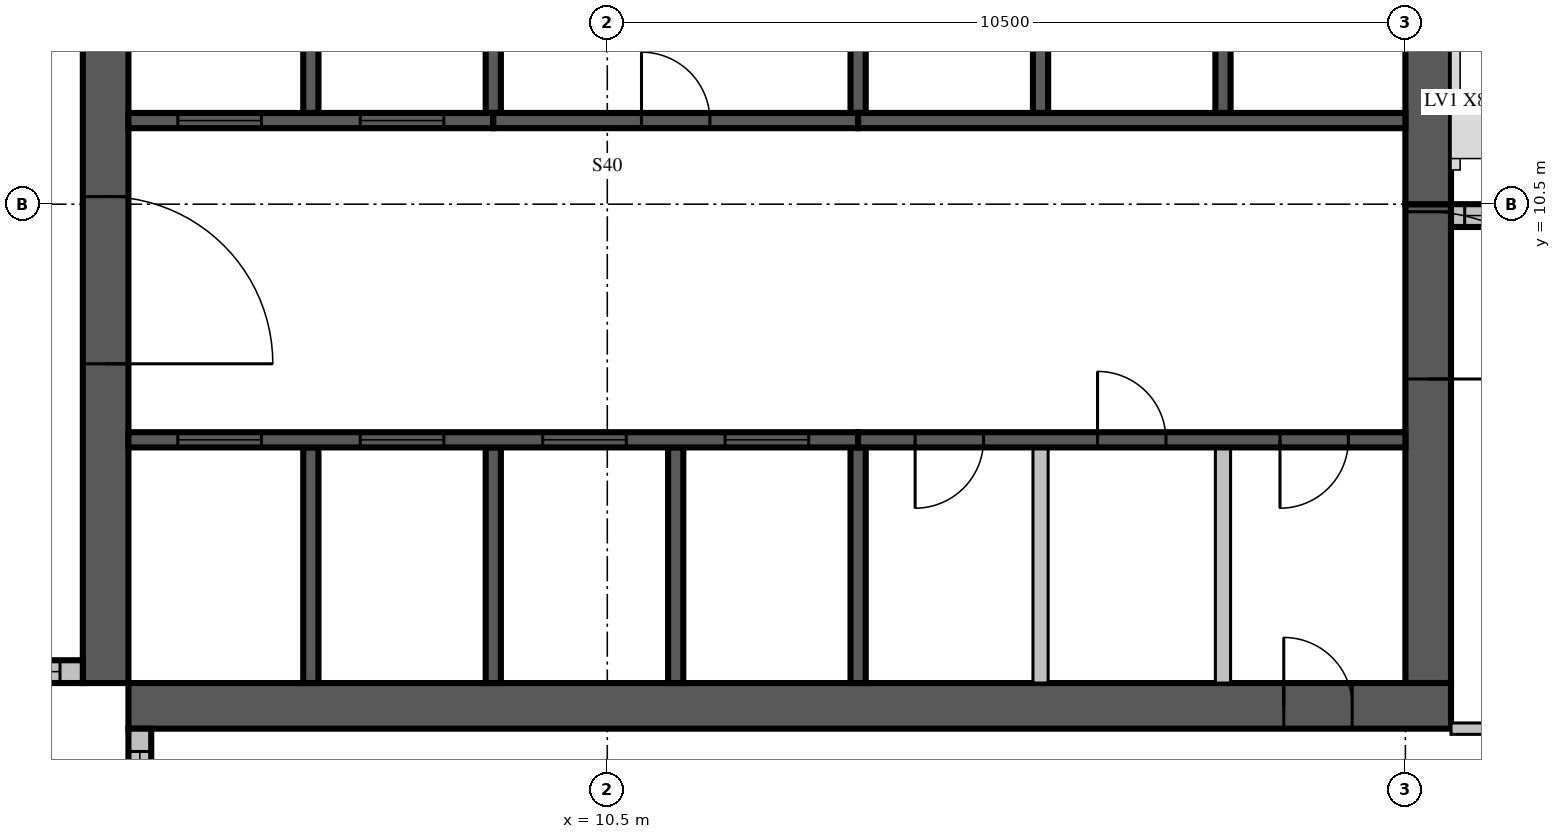
"""IFC4 building model, lengths in metres.
Left out: names, types, materials, properties, quantities, classifications, styles, units other than length and angle.
Written with IfcOpenShell. Run it as: python <this file> out.ifc"""

import sys

from ifc_helpers import new_model, si_unit, direction, frame, frame_2d, origin, place, context, subcontext, project, spatial, rectangle, extrude, source, transform, mapped, element, fill, save


model = new_model("IFC4")
c1 = context("Model", 3, precision=1e-05, world=origin(), true_north=direction((0.0, 1.0)))
c2 = subcontext(c1, "Body", "Model", "MODEL_VIEW")
j1 = project(units=[si_unit("LENGTHUNIT", "METRE"), si_unit("PLANEANGLEUNIT", "RADIAN")], contexts=[c1])
p1 = place(None, origin())
s1 = spatial("IfcSite", under=j1, at=p1, CompositionType="ELEMENT")
p2 = place(p1, origin())
s2 = spatial("IfcBuilding", under=s1, at=p2, CompositionType="ELEMENT")
p3 = place(p2, frame((0.0, 0.0, 326.5)))
s3 = spatial("IfcBuildingStorey", under=s2, at=p3, CompositionType="ELEMENT", Elevation=326.5)
m1 = source(origin(), c2, "Body", "SweptSolid", [
    extrude(rectangle(XDim=17.4, YDim=0.6, at=frame_2d((8.7, 0.0))), origin(), (0.0, 0.0, 1.0), 3.5),
])
p4 = place(p3, frame((3.9, 4.2, 0.0), z_axis=(0.0, 0.0, 1.0), x_axis=(0.0, 1.0, 0.0)))
e1 = element("IfcWall", 1, at=p4, inside=s3, PredefinedType="SHEAR", context=c2, shape_type="MappedRepresentation", body=[
    mapped(m1, transform((0.0, 0.0, 0.0), scale=1.0)),
])
m2 = source(origin(), c2, "Body", "SweptSolid", [
    extrude(rectangle(XDim=2.2, YDim=2.1, at=frame_2d((1.1, 1.05))), frame((0.0, 0.31, 0.0), z_axis=(0.0, -1.0, 0.0), x_axis=(1.0, 0.0, 0.0)), (0.0, 0.0, 1.0), 0.62),
])
p5 = place(p4, frame((4.2, 0.0, 0.0)))
e2 = element("IfcOpeningElement", 2, at=p5, cuts=e1, PredefinedType="OPENING", context=c2, shape_type="MappedRepresentation", body=[
    mapped(m2, transform((0.0, 0.0, 0.0), scale=1.0)),
])
m3 = source(origin(), c2, "Body", "SweptSolid", [
    extrude(rectangle(XDim=6.3, YDim=0.6, at=frame_2d((3.15, 0.0))), origin(), (0.0, 0.0, 1.0), 3.5),
])
p6 = place(p3, frame((21.3, 4.2, 0.0), z_axis=(0.0, 0.0, 1.0), x_axis=(0.0, 1.0, 0.0)))
e3 = element("IfcWall", 3, at=p6, inside=s3, PredefinedType="SHEAR", context=c2, shape_type="MappedRepresentation", body=[
    mapped(m3, transform((0.0, 0.0, 0.0), scale=1.0)),
])
p7 = place(p6, frame((4.0, 0.0, 0.0)))
e4 = element("IfcOpeningElement", 4, at=p7, cuts=e3, PredefinedType="OPENING", context=c2, shape_type="MappedRepresentation", body=[
    mapped(m2, transform((0.0, 0.0, 0.0), scale=1.0)),
])
p8 = place(p3, frame((4.2, 3.9, 0.0), z_axis=(0.0, 0.0, 1.0), x_axis=(1.0, 0.0, 0.0)))
e5 = element("IfcWall", 5, at=p8, inside=s3, PredefinedType="SHEAR", context=c2, shape_type="MappedRepresentation", body=[
    mapped(m1, transform((0.0, 0.0, 0.0), scale=1.0)),
])
m4 = source(origin(), c2, "Body", "SweptSolid", [
    extrude(rectangle(XDim=0.9, YDim=2.1, at=frame_2d((0.45, 1.05))), frame((0.0, 0.31, 0.0), z_axis=(0.0, -1.0, 0.0), x_axis=(1.0, 0.0, 0.0)), (0.0, 0.0, 1.0), 0.62),
])
p9 = place(p8, frame((15.2, 0.0, 0.0)))
e6 = element("IfcOpeningElement", 6, at=p9, cuts=e5, PredefinedType="OPENING", context=c2, shape_type="MappedRepresentation", body=[
    mapped(m4, transform((0.0, 0.0, 0.0), scale=1.0)),
])
m5 = source(origin(), c2, "Body", "SweptSolid", [
    extrude(rectangle(XDim=10.5, YDim=0.6, at=frame_2d((5.25, 0.0))), origin(), (0.0, 0.0, 1.0), 3.5),
])
p10 = place(p3, frame((21.3, 10.5, 0.0), z_axis=(0.0, 0.0, 1.0), x_axis=(0.0, 1.0, 0.0)))
e7 = element("IfcWall", 7, at=p10, inside=s3, PredefinedType="SHEAR", context=c2, shape_type="MappedRepresentation", body=[
    mapped(m5, transform((0.0, 0.0, 0.0), scale=1.0)),
])
m6 = source(origin(), c2, "Body", "SweptSolid", [
    extrude(rectangle(XDim=1.2, YDim=2.4, at=frame_2d((0.6, 1.2))), frame((0.0, 0.31, 0.0), z_axis=(0.0, -1.0, 0.0), x_axis=(1.0, 0.0, 0.0)), (0.0, 0.0, 1.0), 0.62),
])
p11 = place(p10, frame((5.7, 0.0, 0.6)))
e8 = element("IfcOpeningElement", 8, at=p11, cuts=e7, PredefinedType="OPENING", context=c2, shape_type="MappedRepresentation", body=[
    mapped(m6, transform((0.0, 0.0, 0.0), scale=1.0)),
])
p12 = place(p3, frame((29.1, 10.35, 0.0), z_axis=(0.0, 0.0, 1.0), x_axis=(-1.0, 0.0, 0.0)))
e9 = element("IfcWall", 9, at=p12, inside=s3, PredefinedType="STANDARD", context=c2, shape_type="SweptSolid", body=[
    extrude(rectangle(XDim=7.5, YDim=0.3, at=frame_2d((3.75, 0.0))), origin(), (0.0, 0.0, 1.0), 3.1),
])
m7 = source(origin(), c2, "Body", "SweptSolid", [
    extrude(rectangle(XDim=3.0, YDim=2.0, at=frame_2d((1.5, 1.0))), frame((0.0, 0.16, 0.0), z_axis=(0.0, -1.0, 0.0), x_axis=(1.0, 0.0, 0.0)), (0.0, 0.0, 1.0), 0.32),
])
p13 = place(p12, frame((1.14, 0.0, 0.6)))
e10 = element("IfcOpeningElement", 10, at=p13, cuts=e9, PredefinedType="OPENING", context=c2, shape_type="MappedRepresentation", body=[
    mapped(m7, transform((0.0, 0.0, 0.0), scale=1.0)),
])
m8 = source(origin(), c2, "Body", "SweptSolid", [
    extrude(rectangle(XDim=1.8, YDim=2.0, at=frame_2d((0.9, 1.0))), frame((0.0, 0.16, 0.0), z_axis=(0.0, -1.0, 0.0), x_axis=(1.0, 0.0, 0.0)), (0.0, 0.0, 1.0), 0.32),
])
p14 = place(p12, frame((5.52, 0.0, 0.6)))
e11 = element("IfcOpeningElement", 11, at=p14, cuts=e9, PredefinedType="OPENING", context=c2, shape_type="MappedRepresentation", body=[
    mapped(m8, transform((0.0, 0.0, 0.0), scale=1.0)),
])
m9 = source(origin(), c2, "Body", "SweptSolid", [
    extrude(rectangle(XDim=3.6, YDim=0.3, at=frame_2d((1.8, 0.0))), origin(), (0.0, 0.0, 1.0), 3.1),
])
p15 = place(p3, frame((0.0, 4.35, 0.0), z_axis=(0.0, 0.0, 1.0), x_axis=(1.0, 0.0, 0.0)))
e12 = element("IfcWall", 12, at=p15, inside=s3, PredefinedType="STANDARD", context=c2, shape_type="MappedRepresentation", body=[
    mapped(m9, transform((0.0, 0.0, 0.0), scale=1.0)),
])
m10 = source(origin(), c2, "Body", "SweptSolid", [
    extrude(rectangle(XDim=2.4, YDim=2.0, at=frame_2d((1.2, 1.0))), frame((0.0, 0.16, 0.0), z_axis=(0.0, -1.0, 0.0), x_axis=(1.0, 0.0, 0.0)), (0.0, 0.0, 1.0), 0.32),
])
p16 = place(p15, frame((0.9, 0.0, 0.6)))
e13 = element("IfcOpeningElement", 13, at=p16, cuts=e12, PredefinedType="OPENING", context=c2, shape_type="MappedRepresentation", body=[
    mapped(m10, transform((0.0, 0.0, 0.0), scale=1.0)),
])
p17 = place(p3, frame((4.35, 3.6, 0.0), z_axis=(0.0, 0.0, 1.0), x_axis=(0.0, -1.0, 0.0)))
e14 = element("IfcWall", 14, at=p17, inside=s3, PredefinedType="STANDARD", context=c2, shape_type="MappedRepresentation", body=[
    mapped(m9, transform((0.0, 0.0, 0.0), scale=1.0)),
])
p18 = place(p17, frame((0.3, 0.0, 0.6)))
e15 = element("IfcOpeningElement", 15, at=p18, cuts=e14, PredefinedType="OPENING", context=c2, shape_type="MappedRepresentation", body=[
    mapped(m10, transform((0.0, 0.0, 0.0), scale=1.0)),
])
m11 = source(origin(), c2, "Body", "SweptSolid", [
    extrude(rectangle(XDim=3.1, YDim=0.2, at=frame_2d((1.55, 0.0))), origin(), (0.0, 0.0, 1.0), 3.5),
])
for number, where, z_axis, x_axis in (
    (16, (6.6, 4.2, 0.0), (0.0, 0.0, 1.0), (0.0, 1.0, 0.0)),
    (17, (9.0, 4.2, 0.0), (0.0, 0.0, 1.0), (0.0, 1.0, 0.0)),
    (18, (11.4, 4.2, 0.0), (0.0, 0.0, 1.0), (0.0, 1.0, 0.0)),
):
    element("IfcWall", number, at=place(p3, frame(where, z_axis=z_axis, x_axis=x_axis)), inside=s3, PredefinedType="SOLIDWALL", context=c2, shape_type="MappedRepresentation", body=[
        mapped(m11, transform((0.0, 0.0, 0.0), scale=1.0)),
    ])
m12 = source(origin(), c2, "Body", "SweptSolid", [
    extrude(rectangle(XDim=3.1, YDim=0.2, at=frame_2d((1.55, 0.0))), origin(), (0.0, 0.0, 1.0), 3.1),
])
p19 = place(p3, frame((13.8, 4.2, 0.0), z_axis=(0.0, 0.0, 1.0), x_axis=(0.0, 1.0, 0.0)))
e19 = element("IfcWall", 19, at=p19, inside=s3, PredefinedType="SOLIDWALL", context=c2, shape_type="MappedRepresentation", body=[
    mapped(m12, transform((0.0, 0.0, 0.0), scale=1.0)),
])
m13 = source(origin(), c2, "Body", "SweptSolid", [
    extrude(rectangle(XDim=3.1, YDim=0.2, at=frame_2d((1.55, 0.0))), origin(), (0.0, 0.0, 1.0), 3.1),
])
for number, where, z_axis, x_axis in (
    (20, (16.2, 4.2, 0.0), (0.0, 0.0, 1.0), (0.0, 1.0, 0.0)),
    (21, (18.6, 4.2, 0.0), (0.0, 0.0, 1.0), (0.0, 1.0, 0.0)),
):
    element("IfcWall", number, at=place(p3, frame(where, z_axis=z_axis, x_axis=x_axis)), inside=s3, PredefinedType="PARTITIONING", context=c2, shape_type="MappedRepresentation", body=[
        mapped(m13, transform((0.0, 0.0, 0.0), scale=1.0)),
    ])
m14 = source(origin(), c2, "Body", "SweptSolid", [
    extrude(rectangle(XDim=3.0, YDim=0.2, at=frame_2d((1.5, 0.0))), origin(), (0.0, 0.0, 1.0), 3.5),
])
p20 = place(p3, frame((6.6, 11.7, 0.0), z_axis=(0.0, 0.0, 1.0), x_axis=(0.0, 1.0, 0.0)))
e22 = element("IfcWall", 22, at=p20, inside=s3, PredefinedType="SOLIDWALL", context=c2, shape_type="MappedRepresentation", body=[
    mapped(m14, transform((0.0, 0.0, 0.0), scale=1.0)),
])
m15 = source(origin(), c2, "Body", "SweptSolid", [
    extrude(rectangle(XDim=3.0, YDim=0.2, at=frame_2d((1.5, 0.0))), origin(), (0.0, 0.0, 1.0), 3.1),
])
for number, where, z_axis, x_axis in (
    (23, (9.0, 11.7, 0.0), (0.0, 0.0, 1.0), (0.0, 1.0, 0.0)),
    (24, (13.8, 11.7, 0.0), (0.0, 0.0, 1.0), (0.0, 1.0, 0.0)),
):
    element("IfcWall", number, at=place(p3, frame(where, z_axis=z_axis, x_axis=x_axis)), inside=s3, PredefinedType="SOLIDWALL", context=c2, shape_type="MappedRepresentation", body=[
        mapped(m15, transform((0.0, 0.0, 0.0), scale=1.0)),
    ])
for number, where, z_axis, x_axis in (
    (25, (16.2, 11.7, 0.0), (0.0, 0.0, 1.0), (0.0, 1.0, 0.0)),
    (26, (18.6, 11.7, 0.0), (0.0, 0.0, 1.0), (0.0, 1.0, 0.0)),
):
    element("IfcWall", number, at=place(p3, frame(where, z_axis=z_axis, x_axis=x_axis)), inside=s3, PredefinedType="SOLIDWALL", context=c2, shape_type="MappedRepresentation", body=[
        mapped(m14, transform((0.0, 0.0, 0.0), scale=1.0)),
    ])
m16 = source(origin(), c2, "Body", "SweptSolid", [
    extrude(rectangle(XDim=9.6, YDim=0.2, at=frame_2d((4.8, 0.0))), origin(), (0.0, 0.0, 1.0), 3.5),
])
p21 = place(p3, frame((4.2, 7.4, 0.0), z_axis=(0.0, 0.0, 1.0), x_axis=(1.0, 0.0, 0.0)))
e27 = element("IfcWall", 27, at=p21, inside=s3, PredefinedType="SOLIDWALL", context=c2, shape_type="MappedRepresentation", body=[
    mapped(m16, transform((0.0, 0.0, 0.0), scale=1.0)),
])
m17 = source(origin(), c2, "Body", "SweptSolid", [
    extrude(rectangle(XDim=1.1, YDim=2.1, at=frame_2d((0.55, 1.05))), frame((0.0, 0.11, 0.0), z_axis=(0.0, -1.0, 0.0), x_axis=(1.0, 0.0, 0.0)), (0.0, 0.0, 1.0), 0.22),
])
p22 = place(p21, frame((0.65, 0.0, 0.0)))
e28 = element("IfcOpeningElement", 28, at=p22, cuts=e27, PredefinedType="OPENING", context=c2, shape_type="MappedRepresentation", body=[
    mapped(m17, transform((0.0, 0.0, 0.0), scale=1.0)),
])
p23 = place(p21, frame((3.05, 0.0, 0.0)))
e29 = element("IfcOpeningElement", 29, at=p23, cuts=e27, PredefinedType="OPENING", context=c2, shape_type="MappedRepresentation", body=[
    mapped(m17, transform((0.0, 0.0, 0.0), scale=1.0)),
])
p24 = place(p21, frame((5.45, 0.0, 0.0)))
e30 = element("IfcOpeningElement", 30, at=p24, cuts=e27, PredefinedType="OPENING", context=c2, shape_type="MappedRepresentation", body=[
    mapped(m17, transform((0.0, 0.0, 0.0), scale=1.0)),
])
p25 = place(p21, frame((7.85, 0.0, 0.0)))
e31 = element("IfcOpeningElement", 31, at=p25, cuts=e27, PredefinedType="OPENING", context=c2, shape_type="MappedRepresentation", body=[
    mapped(m17, transform((0.0, 0.0, 0.0), scale=1.0)),
])
m18 = source(origin(), c2, "Body", "SweptSolid", [
    extrude(rectangle(XDim=7.2, YDim=0.2, at=frame_2d((3.6, 0.0))), origin(), (0.0, 0.0, 1.0), 3.1),
])
p26 = place(p3, frame((13.8, 7.4, 0.0), z_axis=(0.0, 0.0, 1.0), x_axis=(1.0, 0.0, 0.0)))
e32 = element("IfcWall", 32, at=p26, inside=s3, PredefinedType="SOLIDWALL", context=c2, shape_type="MappedRepresentation", body=[
    mapped(m18, transform((0.0, 0.0, 0.0), scale=1.0)),
])
m19 = source(origin(), c2, "Body", "SweptSolid", [
    extrude(rectangle(XDim=0.9, YDim=2.1, at=frame_2d((0.45, 1.05))), frame((0.0, 0.11, 0.0), z_axis=(0.0, -1.0, 0.0), x_axis=(1.0, 0.0, 0.0)), (0.0, 0.0, 1.0), 0.22),
])
p27 = place(p26, frame((0.75, 0.0, 0.0)))
e33 = element("IfcOpeningElement", 33, at=p27, cuts=e32, PredefinedType="OPENING", context=c2, shape_type="MappedRepresentation", body=[
    mapped(m19, transform((0.0, 0.0, 0.0), scale=1.0)),
])
p28 = place(p26, frame((3.15, 0.0, 0.0)))
e34 = element("IfcOpeningElement", 34, at=p28, cuts=e32, PredefinedType="OPENING", context=c2, shape_type="MappedRepresentation", body=[
    mapped(m19, transform((0.0, 0.0, 0.0), scale=1.0)),
])
p29 = place(p26, frame((5.55, 0.0, 0.0)))
e35 = element("IfcOpeningElement", 35, at=p29, cuts=e32, PredefinedType="OPENING", context=c2, shape_type="MappedRepresentation", body=[
    mapped(m19, transform((0.0, 0.0, 0.0), scale=1.0)),
])
m20 = source(origin(), c2, "Body", "SweptSolid", [
    extrude(rectangle(XDim=4.8, YDim=0.2, at=frame_2d((2.4, 0.0))), origin(), (0.0, 0.0, 1.0), 3.5),
])
p30 = place(p3, frame((4.2, 11.6, 0.0), z_axis=(0.0, 0.0, 1.0), x_axis=(1.0, 0.0, 0.0)))
e36 = element("IfcWall", 36, at=p30, inside=s3, PredefinedType="SOLIDWALL", context=c2, shape_type="MappedRepresentation", body=[
    mapped(m20, transform((0.0, 0.0, 0.0), scale=1.0)),
])
p31 = place(p30, frame((0.65, 0.0, 0.0)))
e37 = element("IfcOpeningElement", 37, at=p31, cuts=e36, PredefinedType="OPENING", context=c2, shape_type="MappedRepresentation", body=[
    mapped(m17, transform((0.0, 0.0, 0.0), scale=1.0)),
])
p32 = place(p30, frame((3.05, 0.0, 0.0)))
e38 = element("IfcOpeningElement", 38, at=p32, cuts=e36, PredefinedType="OPENING", context=c2, shape_type="MappedRepresentation", body=[
    mapped(m17, transform((0.0, 0.0, 0.0), scale=1.0)),
])
m21 = source(origin(), c2, "Body", "SweptSolid", [
    extrude(rectangle(XDim=4.8, YDim=0.2, at=frame_2d((2.4, 0.0))), origin(), (0.0, 0.0, 1.0), 3.1),
])
p33 = place(p3, frame((9.0, 11.6, 0.0), z_axis=(0.0, 0.0, 1.0), x_axis=(1.0, 0.0, 0.0)))
e39 = element("IfcWall", 39, at=p33, inside=s3, PredefinedType="SOLIDWALL", context=c2, shape_type="MappedRepresentation", body=[
    mapped(m21, transform((0.0, 0.0, 0.0), scale=1.0)),
])
p34 = place(p33, frame((1.95, 0.0, 0.0)))
e40 = element("IfcOpeningElement", 40, at=p34, cuts=e39, PredefinedType="OPENING", context=c2, shape_type="MappedRepresentation", body=[
    mapped(m19, transform((0.0, 0.0, 0.0), scale=1.0)),
])
m22 = source(origin(), c2, "Body", "SweptSolid", [
    extrude(rectangle(XDim=7.2, YDim=0.2, at=frame_2d((3.6, 0.0))), origin(), (0.0, 0.0, 1.0), 3.5),
])
p35 = place(p3, frame((13.8, 11.6, 0.0), z_axis=(0.0, 0.0, 1.0), x_axis=(1.0, 0.0, 0.0)))
e41 = element("IfcWall", 41, at=p35, inside=s3, PredefinedType="SOLIDWALL", context=c2, shape_type="MappedRepresentation", body=[
    mapped(m22, transform((0.0, 0.0, 0.0), scale=1.0)),
])
m23 = source(origin(), c2, "Body", "SweptSolid", [
    extrude(rectangle(XDim=7.725, YDim=0.15, at=frame_2d((3.862, 0.0))), origin(), (0.0, 0.0, 1.0), 3.1),
])
p36 = place(p3, frame((21.6, 3.6, 0.0), z_axis=(0.0, 0.0, 1.0), x_axis=(1.0, 0.0, 0.0)))
e42 = element("IfcWall", 42, at=p36, inside=s3, PredefinedType="PARTITIONING", context=c2, shape_type="MappedRepresentation", body=[
    mapped(m23, transform((0.0, 0.0, 0.0), scale=1.0)),
])
m24 = source(origin(), c2, "Body", "SweptSolid", [
    extrude(rectangle(XDim=1.2, YDim=2.1, at=frame_2d((0.6, 1.05))), frame((0.0, 0.085, 0.0), z_axis=(0.0, -1.0, 0.0), x_axis=(1.0, 0.0, 0.0)), (0.0, 0.0, 1.0), 0.17),
])
p37 = place(p36, frame((0.7, 0.0, 0.0)))
e43 = element("IfcOpeningElement", 43, at=p37, cuts=e42, PredefinedType="OPENING", context=c2, shape_type="MappedRepresentation", body=[
    mapped(m24, transform((0.0, 0.0, 0.0), scale=1.0)),
])
m25 = source(origin(), c2, "Body", "SweptSolid", [
    extrude(rectangle(XDim=0.9, YDim=2.1, at=frame_2d((0.45, 1.05))), frame((0.0, 0.085, 0.0), z_axis=(0.0, -1.0, 0.0), x_axis=(1.0, 0.0, 0.0)), (0.0, 0.0, 1.0), 0.17),
])
p38 = place(p36, frame((3.413, 0.0, 0.0)))
e44 = element("IfcOpeningElement", 44, at=p38, cuts=e42, PredefinedType="OPENING", context=c2, shape_type="MappedRepresentation", body=[
    mapped(m25, transform((0.0, 0.0, 0.0), scale=1.0)),
])
m26 = source(origin(), c2, "Body", "SweptSolid", [
    extrude(rectangle(XDim=1.8, YDim=2.0, at=frame_2d((0.9, 1.0))), frame((0.0, 0.03, 0.0), z_axis=(0.0, -1.0, 0.0), x_axis=(1.0, 0.0, 0.0)), (0.0, 0.0, 1.0), 0.06),
])
p39 = place(p14, origin())
e45 = element("IfcWindow", 45, at=p39, inside=s3, PartitioningType="SINGLE_PANEL", PredefinedType="WINDOW", context=c2, shape_type="MappedRepresentation", body=[
    mapped(m26, transform((0.0, 0.0, 0.0), scale=1.0)),
])
fill(e11, e45)
m27 = source(origin(), c2, "Body", "SweptSolid", [
    extrude(rectangle(XDim=2.4, YDim=2.0, at=frame_2d((1.2, 1.0))), frame((0.0, 0.03, 0.0), z_axis=(0.0, -1.0, 0.0), x_axis=(1.0, 0.0, 0.0)), (0.0, 0.0, 1.0), 0.06),
])
p40 = place(p16, origin())
e46 = element("IfcWindow", 46, at=p40, inside=s3, PartitioningType="SINGLE_PANEL", PredefinedType="WINDOW", context=c2, shape_type="MappedRepresentation", body=[
    mapped(m27, transform((0.0, 0.0, 0.0), scale=1.0)),
])
fill(e13, e46)
p41 = place(p18, origin())
e47 = element("IfcWindow", 47, at=p41, inside=s3, PartitioningType="SINGLE_PANEL", PredefinedType="WINDOW", context=c2, shape_type="MappedRepresentation", body=[
    mapped(m27, transform((0.0, 0.0, 0.0), scale=1.0)),
])
fill(e15, e47)
m28 = source(origin(), c2, "Body", "SweptSolid", [
    extrude(rectangle(XDim=1.1, YDim=2.1, at=frame_2d((0.55, 1.05))), frame((0.0, 0.025, 0.0), z_axis=(0.0, -1.0, 0.0), x_axis=(1.0, 0.0, 0.0)), (0.0, 0.0, 1.0), 0.05),
])
p42 = place(p22, origin())
e48 = element("IfcDoor", 48, at=p42, inside=s3, OperationType="SLIDING_TO_LEFT", PredefinedType="DOOR", context=c2, shape_type="MappedRepresentation", body=[
    mapped(m28, transform((0.0, 0.0, 0.0), scale=1.0)),
])
fill(e28, e48)
p43 = place(p23, origin())
e49 = element("IfcDoor", 49, at=p43, inside=s3, OperationType="SLIDING_TO_LEFT", PredefinedType="DOOR", context=c2, shape_type="MappedRepresentation", body=[
    mapped(m28, transform((0.0, 0.0, 0.0), scale=1.0)),
])
fill(e29, e49)
p44 = place(p24, origin())
e50 = element("IfcDoor", 50, at=p44, inside=s3, OperationType="SLIDING_TO_LEFT", PredefinedType="DOOR", context=c2, shape_type="MappedRepresentation", body=[
    mapped(m28, transform((0.0, 0.0, 0.0), scale=1.0)),
])
fill(e30, e50)
p45 = place(p25, origin())
e51 = element("IfcDoor", 51, at=p45, inside=s3, OperationType="SLIDING_TO_LEFT", PredefinedType="DOOR", context=c2, shape_type="MappedRepresentation", body=[
    mapped(m28, transform((0.0, 0.0, 0.0), scale=1.0)),
])
fill(e31, e51)
m29 = source(origin(), c2, "Body", "SweptSolid", [
    extrude(rectangle(XDim=0.9, YDim=2.1, at=frame_2d((0.45, 1.05))), frame((0.0, 0.025, 0.0), z_axis=(0.0, -1.0, 0.0), x_axis=(1.0, 0.0, 0.0)), (0.0, 0.0, 1.0), 0.05),
])
p46 = place(p27, origin())
e52 = element("IfcDoor", 52, at=p46, inside=s3, OperationType="SINGLE_SWING_RIGHT", PredefinedType="DOOR", context=c2, shape_type="MappedRepresentation", body=[
    mapped(m29, transform((0.0, 0.0, 0.0), scale=1.0)),
])
fill(e33, e52)
p47 = place(p28, origin())
e53 = element("IfcDoor", 53, at=p47, inside=s3, OperationType="SINGLE_SWING_LEFT", PredefinedType="DOOR", context=c2, shape_type="MappedRepresentation", body=[
    mapped(m29, transform((0.0, 0.0, 0.0), scale=1.0)),
])
fill(e34, e53)
p48 = place(p29, origin())
e54 = element("IfcDoor", 54, at=p48, inside=s3, OperationType="SINGLE_SWING_RIGHT", PredefinedType="DOOR", context=c2, shape_type="MappedRepresentation", body=[
    mapped(m29, transform((0.0, 0.0, 0.0), scale=1.0)),
])
fill(e35, e54)
p49 = place(p31, origin())
e55 = element("IfcDoor", 55, at=p49, inside=s3, OperationType="SLIDING_TO_LEFT", PredefinedType="DOOR", context=c2, shape_type="MappedRepresentation", body=[
    mapped(m28, transform((0.0, 0.0, 0.0), scale=1.0)),
])
fill(e37, e55)
p50 = place(p32, origin())
e56 = element("IfcDoor", 56, at=p50, inside=s3, OperationType="SLIDING_TO_LEFT", PredefinedType="DOOR", context=c2, shape_type="MappedRepresentation", body=[
    mapped(m28, transform((0.0, 0.0, 0.0), scale=1.0)),
])
fill(e38, e56)
p51 = place(p34, origin())
e57 = element("IfcDoor", 57, at=p51, inside=s3, OperationType="SINGLE_SWING_LEFT", PredefinedType="DOOR", context=c2, shape_type="MappedRepresentation", body=[
    mapped(m29, transform((0.0, 0.0, 0.0), scale=1.0)),
])
fill(e40, e57)
m30 = source(origin(), c2, "Body", "SweptSolid", [
    extrude(rectangle(XDim=2.2, YDim=2.1, at=frame_2d((1.1, 1.05))), frame((0.0, 0.025, 0.0), z_axis=(0.0, -1.0, 0.0), x_axis=(1.0, 0.0, 0.0)), (0.0, 0.0, 1.0), 0.05),
])
p52 = place(p7, origin())
e58 = element("IfcDoor", 58, at=p52, inside=s3, OperationType="DOUBLE_DOOR_SINGLE_SWING", PredefinedType="DOOR", context=c2, shape_type="MappedRepresentation", body=[
    mapped(m30, transform((0.0, 0.0, 0.0), scale=1.0)),
])
fill(e4, e58)
p53 = place(p5, origin())
e59 = element("IfcDoor", 59, at=p53, inside=s3, OperationType="DOUBLE_DOOR_SINGLE_SWING", PredefinedType="DOOR", context=c2, shape_type="MappedRepresentation", body=[
    mapped(m30, transform((0.0, 0.0, 0.0), scale=1.0)),
])
fill(e2, e59)
p54 = place(p9, origin())
e60 = element("IfcDoor", 60, at=p54, inside=s3, OperationType="SINGLE_SWING_LEFT", PredefinedType="DOOR", context=c2, shape_type="MappedRepresentation", body=[
    mapped(m29, transform((0.0, 0.0, 0.0), scale=1.0)),
])
fill(e6, e60)
save(model, sys.argv[1])
